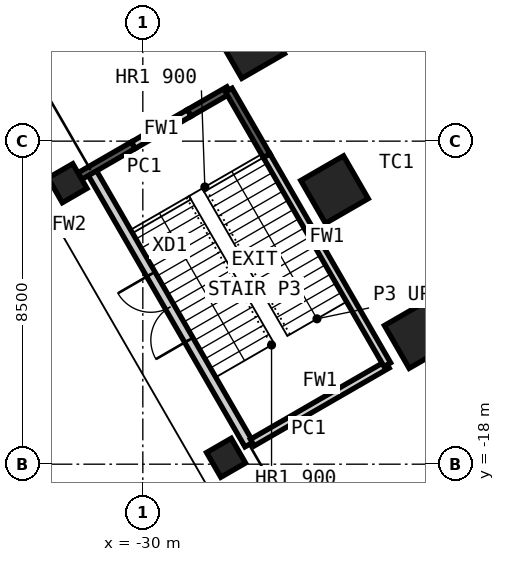
"""IFC4 building model, lengths in metres.
Left out: names, types, materials, properties, quantities, classifications, styles, units other than length and angle.
Written with IfcOpenShell. Run it as: python <this file> out.ifc"""

import sys

from ifc_helpers import new_model, si_unit, direction, frame, frame_2d, origin, origin_2d, place, context, subcontext, project, spatial, rectangle, hollow_rectangle, extrude, element, fill, save


model = new_model("IFC4")
c1 = context("Model", 3, precision=1e-05, world=origin(), true_north=direction((0.0, 1.0)))
c2 = subcontext(c1, "Body", "Model", "MODEL_VIEW")
j1 = project(units=[si_unit("LENGTHUNIT", "METRE"), si_unit("PLANEANGLEUNIT", "RADIAN")], contexts=[c1])
p1 = place(None, origin())
s1 = spatial("IfcSite", under=j1, at=p1, CompositionType="ELEMENT")
p2 = place(p1, origin())
s2 = spatial("IfcBuilding", under=s1, at=p2, CompositionType="ELEMENT")
p3 = place(p2, origin())
s3 = spatial("IfcBuildingStorey", under=s2, at=p3, CompositionType="ELEMENT", Elevation=0.0)
for number, where, z_axis, x_axis in (
    (1, (-22.754, -14.589, 0.0), (0.0, 0.0, 1.0), (0.5, -0.866, 0.0)),
    (2, (-24.956, -10.775, 0.0), (0.0, 0.0, 1.0), (0.5, -0.866, 0.0)),
    (3, (-27.158, -6.96, 0.0), (0.0, 0.0, 1.0), (0.5, -0.866, 0.0)),
):
    element("IfcColumn", number, at=place(p3, frame(where, z_axis=z_axis, x_axis=x_axis)), inside=s3, PredefinedType="COLUMN", context=c2, shape_type="SweptSolid", body=[
        extrude(hollow_rectangle(XDim=1.3, YDim=1.3, WallThickness=0.1, at=origin_2d()), origin(), (0.0, 0.0, 1.0), 6.0),
    ])
for number, where, z_axis, x_axis in (
    (4, (-27.81, -17.831, 0.0), (0.0, 0.0, 1.0), (0.5, -0.866, 0.0)),
    (5, (-31.981, -10.607, 0.0), (0.0, 0.0, 1.0), (0.5, -0.866, 0.0)),
):
    element("IfcColumn", number, at=place(p3, frame(where, z_axis=z_axis, x_axis=x_axis)), inside=s3, PredefinedType="COLUMN", context=c2, shape_type="SweptSolid", body=[
        extrude(hollow_rectangle(XDim=0.75, YDim=0.75, WallThickness=0.036, at=origin_2d()), origin(), (0.0, 0.0, 1.0), 6.0),
    ])
p4 = place(p3, frame((-27.204, -17.481, 0.0), z_axis=(0.0, 0.0, 1.0), x_axis=(-0.500004511595, 0.866022798998, 0.0)))
e6 = element("IfcWall", 6, at=p4, inside=s3, PredefinedType="SOLIDWALL", context=c2, shape_type="SweptSolid", body=[
    extrude(rectangle(XDim=8.342, YDim=0.25, at=frame_2d((4.171, 0.0))), origin(), (0.0, 0.0, 1.0), 5.75),
])
p5 = place(p4, frame((3.171, 0.0, 0.0)))
e7 = element("IfcOpeningElement", 7, at=p5, cuts=e6, PredefinedType="OPENING", context=c2, shape_type="SweptSolid", body=[
    extrude(rectangle(XDim=2.0, YDim=2.4, at=frame_2d((1.0, 1.2))), frame((0.0, 0.135, 0.0), z_axis=(0.0, -1.0, 0.0), x_axis=(1.0, 0.0, 0.0)), (0.0, 0.0, 1.0), 0.27),
])
p6 = place(p3, frame((-27.117, -17.431, 0.0), z_axis=(0.0, 0.0, 1.0), x_axis=(0.8660249478, 0.500000789788, 0.0)))
e8 = element("IfcWall", 8, at=p6, inside=s3, PredefinedType="PARTITIONING", context=c2, shape_type="SweptSolid", body=[
    extrude(rectangle(XDim=4.1, YDim=0.2, at=frame_2d((2.05, 0.0))), origin(), (0.0, 0.0, 1.0), 5.75),
])
p7 = place(p3, frame((-31.656, -10.419, 0.0), z_axis=(0.0, 0.0, 1.0), x_axis=(0.866053003207, 0.499952193351, 0.0)))
e9 = element("IfcWall", 9, at=p7, inside=s3, PredefinedType="PARTITIONING", context=c2, shape_type="SweptSolid", body=[
    extrude(rectangle(XDim=1.625, YDim=0.2, at=frame_2d((0.812, 0.0))), origin(), (0.0, 0.0, 1.0), 5.75),
])
p8 = place(p3, frame((-23.567, -15.381, 0.0), z_axis=(0.0, 0.0, 1.0), x_axis=(-0.500005339912, 0.866022320763, 0.0)))
e10 = element("IfcWall", 10, at=p8, inside=s3, PredefinedType="PARTITIONING", context=c2, shape_type="SweptSolid", body=[
    extrude(rectangle(XDim=6.35, YDim=0.2, at=frame_2d((3.175, 0.0))), origin(), (0.0, 0.0, 1.0), 5.75),
])
p9 = place(p3, frame((-30.249, -9.607, 0.0), z_axis=(0.0, 0.0, 1.0), x_axis=(0.86605165483, 0.499954529098, 0.0)))
e11 = element("IfcWall", 11, at=p9, inside=s3, PredefinedType="PARTITIONING", context=c2, shape_type="SweptSolid", body=[
    extrude(rectangle(XDim=1.7, YDim=0.2, at=frame_2d((0.85, 0.0))), origin(), (0.0, 0.0, 1.0), 5.75),
])
p10 = place(p3, frame((-28.777, -8.757, 0.0), z_axis=(0.0, 0.0, 1.0), x_axis=(0.866006032174, 0.500033551112, 0.0)))
e12 = element("IfcWall", 12, at=p10, inside=s3, PredefinedType="PARTITIONING", context=c2, shape_type="SweptSolid", body=[
    extrude(rectangle(XDim=1.2, YDim=0.2, at=frame_2d((0.6, 0.0))), origin(), (0.0, 0.0, 1.0), 5.75),
])
p11 = place(p3, frame((-26.742, -9.882, 0.0), z_axis=(0.0, 0.0, 1.0), x_axis=(-0.500001870701, 0.866024323732, 0.0)))
e13 = element("IfcWall", 13, at=p11, inside=s3, PredefinedType="PARTITIONING", context=c2, shape_type="SweptSolid", body=[
    extrude(rectangle(XDim=1.992, YDim=0.2, at=frame_2d((0.996, 0.0))), origin(), (0.0, 0.0, 1.0), 5.75),
])
p12 = place(p5, origin())
e14 = element("IfcDoor", 14, at=p12, inside=s3, OperationType="DOUBLE_DOOR_DOUBLE_SWING", PredefinedType="DOOR", context=c2, shape_type="SweptSolid", body=[
    extrude(rectangle(XDim=2.0, YDim=2.4, at=frame_2d((1.0, 1.2))), frame((0.0, 0.025, 0.0), z_axis=(0.0, -1.0, 0.0), x_axis=(1.0, 0.0, 0.0)), (0.0, 0.0, 1.0), 0.05),
])
fill(e7, e14)
save(model, sys.argv[1])
